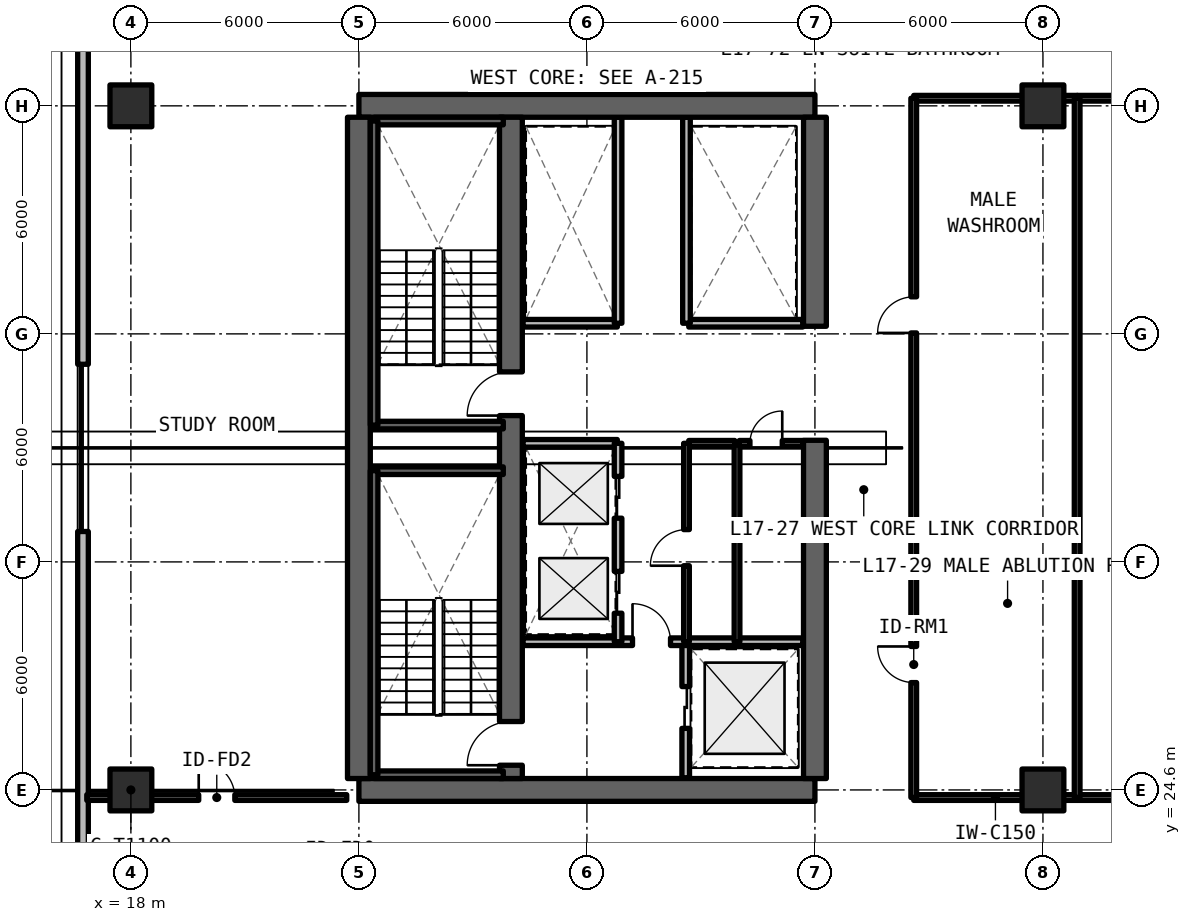
"""IFC4 building model, lengths in metres.
Left out: names, types, materials, properties, quantities, classifications, styles, units other than length and angle.
Written with IfcOpenShell. Run it as: python <this file> out.ifc"""

import sys

from ifc_helpers import new_model, si_unit, direction, frame, frame_2d, origin, origin_2d, place, context, subcontext, project, spatial, rectangle, extrude, element, fill, save


model = new_model("IFC4")
c1 = context("Model", 3, precision=1e-05, world=origin(), true_north=direction((0.0, 1.0)))
c2 = subcontext(c1, "Body", "Model", "MODEL_VIEW")
j1 = project(units=[si_unit("LENGTHUNIT", "METRE"), si_unit("PLANEANGLEUNIT", "RADIAN")], contexts=[c1])
p1 = place(None, origin())
s1 = spatial("IfcSite", under=j1, at=p1, CompositionType="ELEMENT")
p2 = place(p1, origin())
s2 = spatial("IfcBuilding", under=s1, at=p2, CompositionType="ELEMENT")
p3 = place(p2, frame((0.0, 0.0, 62.37)))
s3 = spatial("IfcBuildingStorey", under=s2, at=p3, CompositionType="ELEMENT", Elevation=62.37)
for number, where, z_axis, x_axis in (
    (1, (24.0, 24.6, 0.0), (0.0, 0.0, 1.0), (1.0, 0.0, 0.0)),
    (2, (36.0, 42.6, 0.0), (0.0, 0.0, 1.0), (-1.0, 0.0, 0.0)),
):
    element("IfcWall", number, at=place(p3, frame(where, z_axis=z_axis, x_axis=x_axis)), inside=s3, PredefinedType="SHEAR", context=c2, shape_type="SweptSolid", body=[
        extrude(rectangle(XDim=12.0, YDim=0.6, at=frame_2d((6.0, 0.0))), origin(), (0.0, 0.0, 1.0), 3.63),
    ])
p4 = place(p3, frame((24.0, 24.9, 0.0), z_axis=(0.0, 0.0, 1.0), x_axis=(0.0, 1.0, 0.0)))
e3 = element("IfcWall", 3, at=p4, inside=s3, PredefinedType="SHEAR", context=c2, shape_type="SweptSolid", body=[
    extrude(rectangle(XDim=17.4, YDim=0.6, at=frame_2d((8.7, 0.0))), origin(), (0.0, 0.0, 1.0), 3.63),
])
p5 = place(p3, frame((36.0, 24.9, 0.0), z_axis=(0.0, 0.0, 1.0), x_axis=(0.0, 1.0, 0.0)))
e4 = element("IfcWall", 4, at=p5, inside=s3, PredefinedType="SHEAR", context=c2, shape_type="SweptSolid", body=[
    extrude(rectangle(XDim=8.9, YDim=0.6, at=frame_2d((4.45, 0.0))), origin(), (0.0, 0.0, 1.0), 3.63),
])
p6 = place(p3, frame((36.0, 36.8, 0.0), z_axis=(0.0, 0.0, 1.0), x_axis=(0.0, 1.0, 0.0)))
e5 = element("IfcWall", 5, at=p6, inside=s3, PredefinedType="SHEAR", context=c2, shape_type="SweptSolid", body=[
    extrude(rectangle(XDim=5.5, YDim=0.6, at=frame_2d((2.75, 0.0))), origin(), (0.0, 0.0, 1.0), 3.63),
])
p7 = place(p3, frame((28.0, 24.9, 0.0), z_axis=(0.0, 0.0, 1.0), x_axis=(0.0, 1.0, 0.0)))
e6 = element("IfcWall", 6, at=p7, inside=s3, PredefinedType="SHEAR", context=c2, shape_type="SweptSolid", body=[
    extrude(rectangle(XDim=17.4, YDim=0.6, at=frame_2d((8.7, 0.0))), origin(), (0.0, 0.0, 1.0), 3.63),
])
p8 = place(p7, frame((0.35, 0.0, 0.0)))
e7 = element("IfcOpeningElement", 7, at=p8, cuts=e6, PredefinedType="OPENING", context=c2, shape_type="SweptSolid", body=[
    extrude(rectangle(XDim=1.15, YDim=2.15, at=frame_2d((0.575, 1.075))), frame((0.0, 0.31, 0.0), z_axis=(0.0, -1.0, 0.0), x_axis=(1.0, 0.0, 0.0)), (0.0, 0.0, 1.0), 0.62),
])
p9 = place(p7, frame((9.55, 0.0, 0.0)))
e8 = element("IfcOpeningElement", 8, at=p9, cuts=e6, PredefinedType="OPENING", context=c2, shape_type="SweptSolid", body=[
    extrude(rectangle(XDim=1.15, YDim=2.15, at=frame_2d((0.575, 1.075))), frame((0.0, 0.31, 0.0), z_axis=(0.0, -1.0, 0.0), x_axis=(1.0, 0.0, 0.0)), (0.0, 0.0, 1.0), 0.62),
])
for number, where, z_axis, x_axis in (
    (9, (18.0, 24.6, 0.0), (0.0, 0.0, 1.0), (1.0, 0.0, 0.0)),
    (10, (18.0, 42.6, 0.0), (0.0, 0.0, 1.0), (1.0, 0.0, 0.0)),
    (11, (42.0, 24.6, 0.0), (0.0, 0.0, 1.0), (1.0, 0.0, 0.0)),
    (12, (42.0, 42.6, 0.0), (0.0, 0.0, 1.0), (1.0, 0.0, 0.0)),
):
    element("IfcColumn", number, at=place(p3, frame(where, z_axis=z_axis, x_axis=x_axis)), inside=s3, PredefinedType="COLUMN", context=c2, shape_type="SweptSolid", body=[
        extrude(rectangle(XDim=1.1, YDim=1.1, at=origin_2d()), origin(), (0.0, 0.0, 1.0), 3.63),
    ])
p10 = place(p3, frame((16.74, 55.342, 0.0), z_axis=(0.0, 0.0, 1.0), x_axis=(0.0, -1.0, 0.0)))
e13 = element("IfcWall", 13, at=p10, inside=s3, PredefinedType="SOLIDWALL", context=c2, shape_type="SweptSolid", body=[
    extrude(rectangle(XDim=43.484, YDim=0.28, at=frame_2d((21.742, 0.0))), origin(), (0.0, 0.0, 1.0), 3.41),
])
p11 = place(p10, frame((19.542, 0.0, 0.78)))
e14 = element("IfcOpeningElement", 14, at=p11, cuts=e13, PredefinedType="OPENING", context=c2, shape_type="SweptSolid", body=[
    extrude(rectangle(XDim=4.4, YDim=1.66, at=frame_2d((2.2, 0.83))), frame((0.0, 0.15, 0.0), z_axis=(0.0, -1.0, 0.0), x_axis=(1.0, 0.0, 0.0)), (0.0, 0.0, 1.0), 0.3),
])
p12 = place(p10, frame((37.573, 0.0, 0.78)))
e15 = element("IfcOpeningElement", 15, at=p12, cuts=e13, PredefinedType="OPENING", context=c2, shape_type="SweptSolid", body=[
    extrude(rectangle(XDim=4.4, YDim=1.66, at=frame_2d((2.2, 0.83))), frame((0.0, 0.15, 0.0), z_axis=(0.0, -1.0, 0.0), x_axis=(1.0, 0.0, 0.0)), (0.0, 0.0, 1.0), 0.3),
])
p13 = place(p3, frame((32.6, 24.92, 0.0), z_axis=(0.0, 0.0, 1.0), x_axis=(0.0, 1.0, 0.0)))
e16 = element("IfcWall", 16, at=p13, inside=s3, PredefinedType="SOLIDWALL", context=c2, shape_type="SweptSolid", body=[
    extrude(rectangle(XDim=3.58, YDim=0.2, at=frame_2d((1.79, 0.0))), origin(), (0.0, 0.0, 1.0), 2.63),
])
p14 = place(p13, frame((1.3, 0.0, 0.0)))
e17 = element("IfcOpeningElement", 17, at=p14, cuts=e16, PredefinedType="OPENING", context=c2, shape_type="SweptSolid", body=[
    extrude(rectangle(XDim=1.1, YDim=2.2, at=frame_2d((0.55, 1.1))), frame((0.0, 0.11, 0.0), z_axis=(0.0, -1.0, 0.0), x_axis=(1.0, 0.0, 0.0)), (0.0, 0.0, 1.0), 0.22),
])
p15 = place(p3, frame((28.32, 28.5, 0.0), z_axis=(0.0, 0.0, 1.0), x_axis=(1.0, 0.0, 0.0)))
e18 = element("IfcWall", 18, at=p15, inside=s3, PredefinedType="SOLIDWALL", context=c2, shape_type="SweptSolid", body=[
    extrude(rectangle(XDim=7.36, YDim=0.2, at=frame_2d((3.68, 0.0))), origin(), (0.0, 0.0, 1.0), 2.63),
])
p16 = place(p15, frame((2.88, 0.0, 0.0)))
e19 = element("IfcOpeningElement", 19, at=p16, cuts=e18, PredefinedType="OPENING", context=c2, shape_type="SweptSolid", body=[
    extrude(rectangle(XDim=1.0, YDim=2.15, at=frame_2d((0.5, 1.075))), frame((0.0, 0.11, 0.0), z_axis=(0.0, -1.0, 0.0), x_axis=(1.0, 0.0, 0.0)), (0.0, 0.0, 1.0), 0.22),
])
p17 = place(p3, frame((28.32, 33.72, 0.0), z_axis=(0.0, 0.0, 1.0), x_axis=(1.0, 0.0, 0.0)))
e20 = element("IfcWall", 20, at=p17, inside=s3, PredefinedType="SOLIDWALL", context=c2, shape_type="SweptSolid", body=[
    extrude(rectangle(XDim=2.48, YDim=0.2, at=frame_2d((1.24, 0.0))), origin(), (0.0, 0.0, 1.0), 2.63),
])
p18 = place(p3, frame((30.82, 28.5, 0.0), z_axis=(0.0, 0.0, 1.0), x_axis=(0.0, 1.0, 0.0)))
e21 = element("IfcWall", 21, at=p18, inside=s3, PredefinedType="SOLIDWALL", context=c2, shape_type="SweptSolid", body=[
    extrude(rectangle(XDim=5.22, YDim=0.2, at=frame_2d((2.61, 0.0))), origin(), (0.0, 0.0, 1.0), 2.63),
])
p19 = place(p18, frame((0.75, 0.0, 0.0)))
e22 = element("IfcOpeningElement", 22, at=p19, cuts=e21, PredefinedType="OPENING", context=c2, shape_type="SweptSolid", body=[
    extrude(rectangle(XDim=1.1, YDim=2.2, at=frame_2d((0.55, 1.1))), frame((0.0, 0.11, 0.0), z_axis=(0.0, -1.0, 0.0), x_axis=(1.0, 0.0, 0.0)), (0.0, 0.0, 1.0), 0.22),
])
p20 = place(p18, frame((3.25, 0.0, 0.0)))
e23 = element("IfcOpeningElement", 23, at=p20, cuts=e21, PredefinedType="OPENING", context=c2, shape_type="SweptSolid", body=[
    extrude(rectangle(XDim=1.1, YDim=2.2, at=frame_2d((0.55, 1.1))), frame((0.0, 0.11, 0.0), z_axis=(0.0, -1.0, 0.0), x_axis=(1.0, 0.0, 0.0)), (0.0, 0.0, 1.0), 0.22),
])
p21 = place(p3, frame((33.95, 28.5, 0.0), z_axis=(0.0, 0.0, 1.0), x_axis=(0.0, 1.0, 0.0)))
e24 = element("IfcWall", 24, at=p21, inside=s3, PredefinedType="SOLIDWALL", context=c2, shape_type="SweptSolid", body=[
    extrude(rectangle(XDim=5.22, YDim=0.15, at=frame_2d((2.61, 0.0))), origin(), (0.0, 0.0, 1.0), 2.63),
])
p22 = place(p3, frame((32.68, 33.72, 0.0), z_axis=(0.0, 0.0, 1.0), x_axis=(1.0, 0.0, 0.0)))
e25 = element("IfcWall", 25, at=p22, inside=s3, PredefinedType="SOLIDWALL", context=c2, shape_type="SweptSolid", body=[
    extrude(rectangle(XDim=1.21, YDim=0.15, at=frame_2d((0.605, 0.0))), origin(), (0.0, 0.0, 1.0), 2.63),
])
p23 = place(p3, frame((34.01, 33.72, 0.0), z_axis=(0.0, 0.0, 1.0), x_axis=(1.0, 0.0, 0.0)))
e26 = element("IfcWall", 26, at=p23, inside=s3, PredefinedType="SOLIDWALL", context=c2, shape_type="SweptSolid", body=[
    extrude(rectangle(XDim=1.67, YDim=0.15, at=frame_2d((0.835, 0.0))), origin(), (0.0, 0.0, 1.0), 2.63),
])
p24 = place(p23, frame((0.28, 0.0, 0.0)))
e27 = element("IfcOpeningElement", 27, at=p24, cuts=e26, PredefinedType="OPENING", context=c2, shape_type="SweptSolid", body=[
    extrude(rectangle(XDim=0.85, YDim=2.1, at=frame_2d((0.425, 1.05))), frame((0.0, 0.085, 0.0), z_axis=(0.0, -1.0, 0.0), x_axis=(1.0, 0.0, 0.0)), (0.0, 0.0, 1.0), 0.17),
])
p25 = place(p3, frame((32.62, 28.5, 0.0), z_axis=(0.0, 0.0, 1.0), x_axis=(0.0, 1.0, 0.0)))
e28 = element("IfcWall", 28, at=p25, inside=s3, PredefinedType="SOLIDWALL", context=c2, shape_type="SweptSolid", body=[
    extrude(rectangle(XDim=5.22, YDim=0.15, at=frame_2d((2.61, 0.0))), origin(), (0.0, 0.0, 1.0), 2.63),
])
p26 = place(p25, frame((2.0, 0.0, 0.0)))
e29 = element("IfcOpeningElement", 29, at=p26, cuts=e28, PredefinedType="OPENING", context=c2, shape_type="SweptSolid", body=[
    extrude(rectangle(XDim=0.95, YDim=2.15, at=frame_2d((0.475, 1.075))), frame((0.0, 0.085, 0.0), z_axis=(0.0, -1.0, 0.0), x_axis=(1.0, 0.0, 0.0)), (0.0, 0.0, 1.0), 0.17),
])
p27 = place(p3, frame((28.32, 36.88, 0.0), z_axis=(0.0, 0.0, 1.0), x_axis=(1.0, 0.0, 0.0)))
e30 = element("IfcWall", 30, at=p27, inside=s3, PredefinedType="SOLIDWALL", context=c2, shape_type="SweptSolid", body=[
    extrude(rectangle(XDim=2.48, YDim=0.2, at=frame_2d((1.24, 0.0))), origin(), (0.0, 0.0, 1.0), 2.63),
])
p28 = place(p3, frame((30.82, 36.88, 0.0), z_axis=(0.0, 0.0, 1.0), x_axis=(0.0, 1.0, 0.0)))
e31 = element("IfcWall", 31, at=p28, inside=s3, PredefinedType="SOLIDWALL", context=c2, shape_type="SweptSolid", body=[
    extrude(rectangle(XDim=5.42, YDim=0.2, at=frame_2d((2.71, 0.0))), origin(), (0.0, 0.0, 1.0), 2.63),
])
p29 = place(p3, frame((32.68, 36.88, 0.0), z_axis=(0.0, 0.0, 1.0), x_axis=(1.0, 0.0, 0.0)))
e32 = element("IfcWall", 32, at=p29, inside=s3, PredefinedType="SOLIDWALL", context=c2, shape_type="SweptSolid", body=[
    extrude(rectangle(XDim=3.0, YDim=0.2, at=frame_2d((1.5, 0.0))), origin(), (0.0, 0.0, 1.0), 2.63),
])
p30 = place(p3, frame((32.62, 36.88, 0.0), z_axis=(0.0, 0.0, 1.0), x_axis=(0.0, 1.0, 0.0)))
e33 = element("IfcWall", 33, at=p30, inside=s3, PredefinedType="SOLIDWALL", context=c2, shape_type="SweptSolid", body=[
    extrude(rectangle(XDim=5.42, YDim=0.2, at=frame_2d((2.71, 0.0))), origin(), (0.0, 0.0, 1.0), 2.63),
])
p31 = place(p3, frame((38.6, 24.4, 0.0), z_axis=(0.0, 0.0, 1.0), x_axis=(1.0, 0.0, 0.0)))
e34 = element("IfcWall", 34, at=p31, inside=s3, PredefinedType="SOLIDWALL", context=c2, shape_type="SweptSolid", body=[
    extrude(rectangle(XDim=4.3, YDim=0.15, at=frame_2d((2.15, 0.0))), origin(), (0.0, 0.0, 1.0), 2.625),
])
p32 = place(p3, frame((38.6, 31.4, 0.0), z_axis=(0.0, 0.0, 1.0), x_axis=(1.0, 0.0, 0.0)))
e35 = element("IfcWall", 35, at=p32, inside=s3, PredefinedType="SOLIDWALL", context=c2, shape_type="SweptSolid", body=[
    extrude(rectangle(XDim=4.3, YDim=0.15, at=frame_2d((2.15, 0.0))), origin(), (0.0, 0.0, 1.0), 2.63),
])
p33 = place(p3, frame((38.6, 24.4, 0.0), z_axis=(0.0, 0.0, 1.0), x_axis=(0.0, 1.0, 0.0)))
e36 = element("IfcWall", 36, at=p33, inside=s3, PredefinedType="SOLIDWALL", context=c2, shape_type="SweptSolid", body=[
    extrude(rectangle(XDim=7.0, YDim=0.15, at=frame_2d((3.5, 0.0))), origin(), (0.0, 0.0, 1.0), 2.63),
])
p34 = place(p33, frame((3.025, 0.0, 0.0)))
e37 = element("IfcOpeningElement", 37, at=p34, cuts=e36, PredefinedType="OPENING", context=c2, shape_type="SweptSolid", body=[
    extrude(rectangle(XDim=0.95, YDim=2.15, at=frame_2d((0.475, 1.075))), frame((0.0, 0.085, 0.0), z_axis=(0.0, -1.0, 0.0), x_axis=(1.0, 0.0, 0.0)), (0.0, 0.0, 1.0), 0.17),
])
p35 = place(p3, frame((38.6, 42.8, 0.0), z_axis=(0.0, 0.0, 1.0), x_axis=(1.0, 0.0, 0.0)))
e38 = element("IfcWall", 38, at=p35, inside=s3, PredefinedType="SOLIDWALL", context=c2, shape_type="SweptSolid", body=[
    extrude(rectangle(XDim=4.3, YDim=0.15, at=frame_2d((2.15, 0.0))), origin(), (0.0, 0.0, 1.0), 2.625),
])
p36 = place(p3, frame((38.6, 31.4, 0.0), z_axis=(0.0, 0.0, 1.0), x_axis=(0.0, 1.0, 0.0)))
e39 = element("IfcWall", 39, at=p36, inside=s3, PredefinedType="SOLIDWALL", context=c2, shape_type="SweptSolid", body=[
    extrude(rectangle(XDim=11.4, YDim=0.15, at=frame_2d((5.7, 0.0))), origin(), (0.0, 0.0, 1.0), 2.63),
])
p37 = place(p36, frame((5.225, 0.0, 0.0)))
e40 = element("IfcOpeningElement", 40, at=p37, cuts=e39, PredefinedType="OPENING", context=c2, shape_type="SweptSolid", body=[
    extrude(rectangle(XDim=0.95, YDim=2.15, at=frame_2d((0.475, 1.075))), frame((0.0, 0.085, 0.0), z_axis=(0.0, -1.0, 0.0), x_axis=(1.0, 0.0, 0.0)), (0.0, 0.0, 1.0), 0.17),
])
p38 = place(p3, frame((42.9, 24.4, 0.0), z_axis=(0.0, 0.0, 1.0), x_axis=(1.0, 0.0, 0.0)))
e41 = element("IfcWall", 41, at=p38, inside=s3, PredefinedType="SOLIDWALL", context=c2, shape_type="SweptSolid", body=[
    extrude(rectangle(XDim=27.4, YDim=0.15, at=frame_2d((13.7, 0.0))), origin(), (0.0, 0.0, 1.0), 2.625),
])
p39 = place(p38, frame((13.0, 0.0, 0.0)))
e42 = element("IfcOpeningElement", 42, at=p39, cuts=e41, PredefinedType="OPENING", context=c2, shape_type="SweptSolid", body=[
    extrude(rectangle(XDim=1.4, YDim=2.15, at=frame_2d((0.7, 1.075))), frame((0.0, 0.085, 0.0), z_axis=(0.0, -1.0, 0.0), x_axis=(1.0, 0.0, 0.0)), (0.0, 0.0, 1.0), 0.17),
])
p40 = place(p3, frame((42.9, 42.8, 0.0), z_axis=(0.0, 0.0, 1.0), x_axis=(1.0, 0.0, 0.0)))
e43 = element("IfcWall", 43, at=p40, inside=s3, PredefinedType="SOLIDWALL", context=c2, shape_type="SweptSolid", body=[
    extrude(rectangle(XDim=27.4, YDim=0.15, at=frame_2d((13.7, 0.0))), origin(), (0.0, 0.0, 1.0), 2.625),
])
p41 = place(p3, frame((42.9, 24.4, 0.0), z_axis=(0.0, 0.0, 1.0), x_axis=(0.0, 1.0, 0.0)))
e44 = element("IfcWall", 44, at=p41, inside=s3, PredefinedType="SOLIDWALL", context=c2, shape_type="SweptSolid", body=[
    extrude(rectangle(XDim=18.4, YDim=0.15, at=frame_2d((9.2, 0.0))), origin(), (0.0, 0.0, 1.0), 2.63),
])
p42 = place(p3, frame((16.84, 24.4, 0.0), z_axis=(0.0, 0.0, 1.0), x_axis=(1.0, 0.0, 0.0)))
e45 = element("IfcWall", 45, at=p42, inside=s3, PredefinedType="SOLIDWALL", context=c2, shape_type="SweptSolid", body=[
    extrude(rectangle(XDim=6.84, YDim=0.15, at=frame_2d((3.42, 0.0))), origin(), (0.0, 0.0, 1.0), 2.625),
])
p43 = place(p42, frame((2.945, 0.0, 0.0)))
e46 = element("IfcOpeningElement", 46, at=p43, cuts=e45, PredefinedType="OPENING", context=c2, shape_type="SweptSolid", body=[
    extrude(rectangle(XDim=0.95, YDim=2.15, at=frame_2d((0.475, 1.075))), frame((0.0, 0.085, 0.0), z_axis=(0.0, -1.0, 0.0), x_axis=(1.0, 0.0, 0.0)), (0.0, 0.0, 1.0), 0.17),
])
for number, where, z_axis, x_axis in (
    (47, (24.4, 25.0, 0.0), (0.0, 0.0, 1.0), (1.0, 0.0, 0.0)),
    (48, (27.8, 33.0, 0.0), (0.0, 0.0, 1.0), (-1.0, 0.0, 0.0)),
):
    element("IfcWall", number, at=place(p3, frame(where, z_axis=z_axis, x_axis=x_axis)), inside=s3, PredefinedType="SOLIDWALL", context=c2, shape_type="SweptSolid", body=[
        extrude(rectangle(XDim=3.4, YDim=0.2, at=frame_2d((1.7, 0.0))), origin(), (0.0, 0.0, 1.0), 3.63),
    ])
p44 = place(p3, frame((24.4, 33.0, 0.0), z_axis=(0.0, 0.0, 1.0), x_axis=(0.0, -1.0, 0.0)))
e49 = element("IfcWall", 49, at=p44, inside=s3, PredefinedType="SOLIDWALL", context=c2, shape_type="SweptSolid", body=[
    extrude(rectangle(XDim=8.0, YDim=0.2, at=frame_2d((4.0, 0.0))), origin(), (0.0, 0.0, 1.0), 3.63),
])
for number, where, z_axis, x_axis in (
    (50, (24.4, 34.2, 0.0), (0.0, 0.0, 1.0), (1.0, 0.0, 0.0)),
    (51, (27.8, 42.2, 0.0), (0.0, 0.0, 1.0), (-1.0, 0.0, 0.0)),
):
    element("IfcWall", number, at=place(p3, frame(where, z_axis=z_axis, x_axis=x_axis)), inside=s3, PredefinedType="SOLIDWALL", context=c2, shape_type="SweptSolid", body=[
        extrude(rectangle(XDim=3.4, YDim=0.2, at=frame_2d((1.7, 0.0))), origin(), (0.0, 0.0, 1.0), 3.63),
    ])
p45 = place(p3, frame((24.4, 42.2, 0.0), z_axis=(0.0, 0.0, 1.0), x_axis=(0.0, -1.0, 0.0)))
e52 = element("IfcWall", 52, at=p45, inside=s3, PredefinedType="SOLIDWALL", context=c2, shape_type="SweptSolid", body=[
    extrude(rectangle(XDim=8.0, YDim=0.2, at=frame_2d((4.0, 0.0))), origin(), (0.0, 0.0, 1.0), 3.63),
])
p46 = place(p11, origin())
e53 = element("IfcWindow", 53, at=p46, inside=s3, PartitioningType="SINGLE_PANEL", PredefinedType="WINDOW", context=c2, shape_type="SweptSolid", body=[
    extrude(rectangle(XDim=4.4, YDim=1.66, at=frame_2d((2.2, 0.83))), frame((0.0, 0.03, 0.0), z_axis=(0.0, -1.0, 0.0), x_axis=(1.0, 0.0, 0.0)), (0.0, 0.0, 1.0), 0.06),
])
fill(e14, e53)
p47 = place(p14, origin())
e54 = element("IfcDoor", 54, at=p47, inside=s3, OperationType="SLIDING_TO_LEFT", PredefinedType="DOOR", context=c2, shape_type="SweptSolid", body=[
    extrude(rectangle(XDim=1.1, YDim=2.2, at=frame_2d((0.55, 1.1))), frame((0.0, 0.025, 0.0), z_axis=(0.0, -1.0, 0.0), x_axis=(1.0, 0.0, 0.0)), (0.0, 0.0, 1.0), 0.05),
])
fill(e17, e54)
p48 = place(p16, origin())
e55 = element("IfcDoor", 55, at=p48, inside=s3, OperationType="SINGLE_SWING_LEFT", PredefinedType="DOOR", context=c2, shape_type="SweptSolid", body=[
    extrude(rectangle(XDim=1.0, YDim=2.15, at=frame_2d((0.5, 1.075))), frame((0.0, 0.025, 0.0), z_axis=(0.0, -1.0, 0.0), x_axis=(1.0, 0.0, 0.0)), (0.0, 0.0, 1.0), 0.05),
])
fill(e19, e55)
p49 = place(p19, origin())
e56 = element("IfcDoor", 56, at=p49, inside=s3, OperationType="SLIDING_TO_LEFT", PredefinedType="DOOR", context=c2, shape_type="SweptSolid", body=[
    extrude(rectangle(XDim=1.1, YDim=2.2, at=frame_2d((0.55, 1.1))), frame((0.0, 0.025, 0.0), z_axis=(0.0, -1.0, 0.0), x_axis=(1.0, 0.0, 0.0)), (0.0, 0.0, 1.0), 0.05),
])
fill(e22, e56)
p50 = place(p20, origin())
e57 = element("IfcDoor", 57, at=p50, inside=s3, OperationType="SLIDING_TO_RIGHT", PredefinedType="DOOR", context=c2, shape_type="SweptSolid", body=[
    extrude(rectangle(XDim=1.1, YDim=2.2, at=frame_2d((0.55, 1.1))), frame((0.0, 0.025, 0.0), z_axis=(0.0, -1.0, 0.0), x_axis=(1.0, 0.0, 0.0)), (0.0, 0.0, 1.0), 0.05),
])
fill(e23, e57)
p51 = place(p24, origin())
e58 = element("IfcDoor", 58, at=p51, inside=s3, OperationType="SINGLE_SWING_RIGHT", PredefinedType="DOOR", context=c2, shape_type="SweptSolid", body=[
    extrude(rectangle(XDim=0.85, YDim=2.1, at=frame_2d((0.425, 1.05))), frame((0.0, 0.025, 0.0), z_axis=(0.0, -1.0, 0.0), x_axis=(1.0, 0.0, 0.0)), (0.0, 0.0, 1.0), 0.05),
])
fill(e27, e58)
p52 = place(p26, origin())
e59 = element("IfcDoor", 59, at=p52, inside=s3, OperationType="SINGLE_SWING_LEFT", PredefinedType="DOOR", context=c2, shape_type="SweptSolid", body=[
    extrude(rectangle(XDim=0.95, YDim=2.15, at=frame_2d((0.475, 1.075))), frame((0.0, 0.025, 0.0), z_axis=(0.0, -1.0, 0.0), x_axis=(1.0, 0.0, 0.0)), (0.0, 0.0, 1.0), 0.05),
])
fill(e29, e59)
p53 = place(p34, origin())
e60 = element("IfcDoor", 60, at=p53, inside=s3, OperationType="SINGLE_SWING_RIGHT", PredefinedType="DOOR", context=c2, shape_type="SweptSolid", body=[
    extrude(rectangle(XDim=0.95, YDim=2.15, at=frame_2d((0.475, 1.075))), frame((0.0, 0.025, 0.0), z_axis=(0.0, -1.0, 0.0), x_axis=(1.0, 0.0, 0.0)), (0.0, 0.0, 1.0), 0.05),
])
fill(e37, e60)
p54 = place(p37, origin())
e61 = element("IfcDoor", 61, at=p54, inside=s3, OperationType="SINGLE_SWING_LEFT", PredefinedType="DOOR", context=c2, shape_type="SweptSolid", body=[
    extrude(rectangle(XDim=0.95, YDim=2.15, at=frame_2d((0.475, 1.075))), frame((0.0, 0.025, 0.0), z_axis=(0.0, -1.0, 0.0), x_axis=(1.0, 0.0, 0.0)), (0.0, 0.0, 1.0), 0.05),
])
fill(e40, e61)
p55 = place(p43, origin())
e62 = element("IfcDoor", 62, at=p55, inside=s3, OperationType="SINGLE_SWING_LEFT", PredefinedType="DOOR", context=c2, shape_type="SweptSolid", body=[
    extrude(rectangle(XDim=0.95, YDim=2.15, at=frame_2d((0.475, 1.075))), frame((0.0, 0.025, 0.0), z_axis=(0.0, -1.0, 0.0), x_axis=(1.0, 0.0, 0.0)), (0.0, 0.0, 1.0), 0.05),
])
fill(e46, e62)
p56 = place(p8, origin())
e63 = element("IfcDoor", 63, at=p56, inside=s3, OperationType="SINGLE_SWING_RIGHT", PredefinedType="DOOR", context=c2, shape_type="SweptSolid", body=[
    extrude(rectangle(XDim=1.15, YDim=2.15, at=frame_2d((0.575, 1.075))), frame((0.0, 0.025, 0.0), z_axis=(0.0, -1.0, 0.0), x_axis=(1.0, 0.0, 0.0)), (0.0, 0.0, 1.0), 0.05),
])
fill(e7, e63)
p57 = place(p9, origin())
e64 = element("IfcDoor", 64, at=p57, inside=s3, OperationType="SINGLE_SWING_LEFT", PredefinedType="DOOR", context=c2, shape_type="SweptSolid", body=[
    extrude(rectangle(XDim=1.15, YDim=2.15, at=frame_2d((0.575, 1.075))), frame((0.0, 0.025, 0.0), z_axis=(0.0, -1.0, 0.0), x_axis=(1.0, 0.0, 0.0)), (0.0, 0.0, 1.0), 0.05),
])
fill(e8, e64)
save(model, sys.argv[1])
